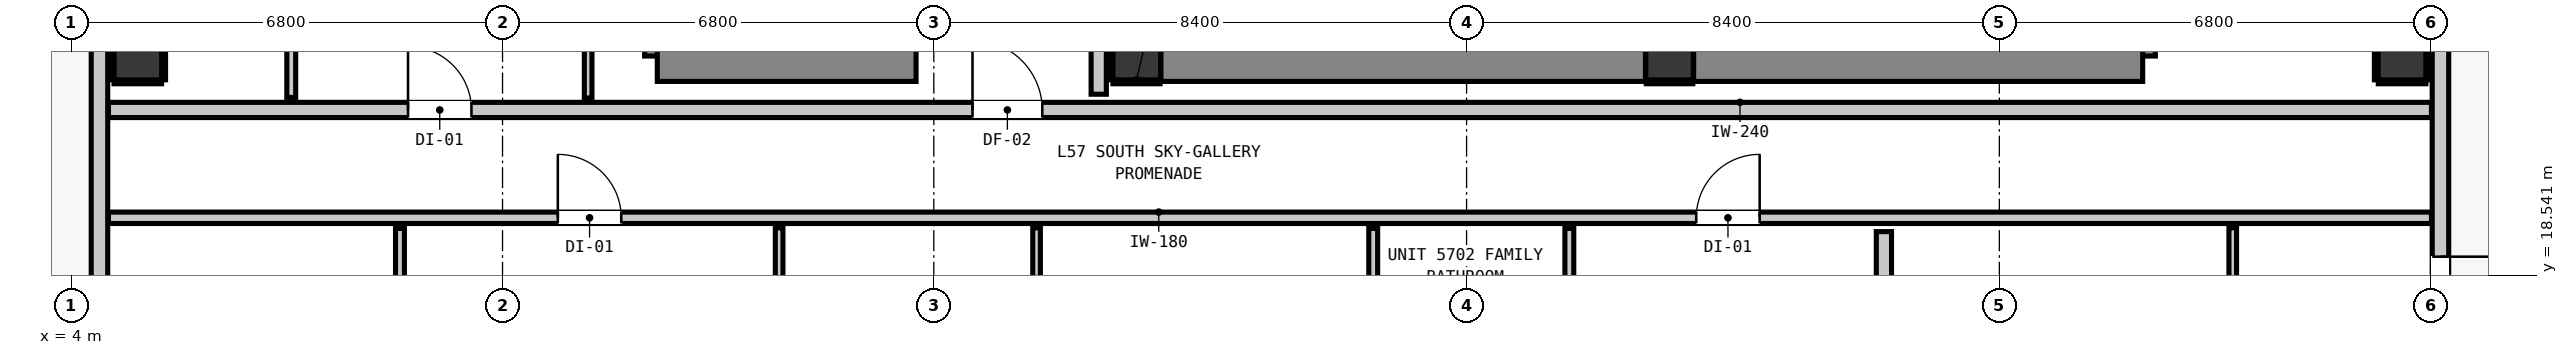
"""IFC4 building model, lengths in metres.
Left out: names, types, materials, properties, quantities, classifications, styles, units other than length and angle.
Written with IfcOpenShell. Run it as: python <this file> out.ifc"""

import sys

from ifc_helpers import new_model, si_unit, direction, frame, frame_2d, origin, origin_2d, place, context, subcontext, project, spatial, rectangle, extrude, element, fill, save


model = new_model("IFC4")
c1 = context("Model", 3, precision=1e-05, world=origin(), true_north=direction((0.0, 1.0)))
c2 = subcontext(c1, "Body", "Model", "MODEL_VIEW")
j1 = project(units=[si_unit("LENGTHUNIT", "METRE"), si_unit("PLANEANGLEUNIT", "RADIAN")], contexts=[c1])
p1 = place(None, origin())
s1 = spatial("IfcSite", under=j1, at=p1, CompositionType="ELEMENT")
p2 = place(p1, origin())
s2 = spatial("IfcBuilding", under=s1, at=p2, CompositionType="ELEMENT")
p3 = place(p2, frame((0.0, 0.0, 196.8)))
s3 = spatial("IfcBuildingStorey", under=s2, at=p3, CompositionType="ELEMENT", Elevation=196.8)
for number, where, z_axis, x_axis in (
    (1, (20.8, 22.0, 0.0), (0.0, 0.0, 1.0), (1.0, 0.0, 0.0)),
    (2, (29.2, 22.0, 0.0), (0.0, 0.0, 1.0), (1.0, 0.0, 0.0)),
):
    element("IfcColumn", number, at=place(p3, frame(where, z_axis=z_axis, x_axis=x_axis)), inside=s3, PredefinedType="COLUMN", context=c2, shape_type="SweptSolid", body=[
        extrude(rectangle(XDim=0.75, YDim=0.75, at=origin_2d()), origin(), (0.0, 0.0, 1.0), 3.32),
    ])
p4 = place(p3, frame((13.44, 22.0, 0.0), z_axis=(0.0, 0.0, 1.0), x_axis=(0.0, 1.0, 0.0)))
e3 = element("IfcWall", 3, at=p4, inside=s3, PredefinedType="SHEAR", context=c2, shape_type="SweptSolid", body=[
    extrude(rectangle(XDim=8.32, YDim=0.8, at=frame_2d((4.16, 0.0))), origin(), (0.0, 0.0, 1.0), 3.32),
])
p5 = place(p3, frame((13.24, 22.0, 0.0), z_axis=(0.0, 0.0, 1.0), x_axis=(1.0, 0.0, 0.0)))
e4 = element("IfcWall", 4, at=p5, inside=s3, PredefinedType="SHEAR", context=c2, shape_type="SweptSolid", body=[
    extrude(rectangle(XDim=4.08, YDim=0.8, at=frame_2d((2.04, 0.0))), origin(), (0.0, 0.0, 1.0), 3.32),
])
p6 = place(p3, frame((36.46, 22.0, 0.0), z_axis=(0.0, 0.0, 1.0), x_axis=(0.0, 1.0, 0.0)))
e5 = element("IfcWall", 5, at=p6, inside=s3, PredefinedType="SHEAR", context=c2, shape_type="SweptSolid", body=[
    extrude(rectangle(XDim=8.32, YDim=0.8, at=frame_2d((4.16, 0.0))), origin(), (0.0, 0.0, 1.0), 3.32),
])
p7 = place(p3, frame((29.58, 22.0, 0.0), z_axis=(0.0, 0.0, 1.0), x_axis=(1.0, 0.0, 0.0)))
e6 = element("IfcWall", 6, at=p7, inside=s3, PredefinedType="SHEAR", context=c2, shape_type="SweptSolid", body=[
    extrude(rectangle(XDim=7.08, YDim=0.8, at=frame_2d((3.54, 0.0))), origin(), (0.0, 0.0, 1.0), 3.32),
])
p8 = place(p3, frame((21.18, 22.0, 0.0), z_axis=(0.0, 0.0, 1.0), x_axis=(1.0, 0.0, 0.0)))
e7 = element("IfcWall", 7, at=p8, inside=s3, PredefinedType="SHEAR", context=c2, shape_type="SweptSolid", body=[
    extrude(rectangle(XDim=7.64, YDim=0.8, at=frame_2d((3.82, 0.0))), origin(), (0.0, 0.0, 1.0), 3.32),
])
for number, where, z_axis, x_axis in (
    (8, (5.05, 22.0, 0.0), (0.0, 0.0, 1.0), (1.0, 0.0, 0.0)),
    (9, (40.75, 22.0, 0.0), (0.0, 0.0, 1.0), (1.0, 0.0, 0.0)),
):
    element("IfcColumn", number, at=place(p3, frame(where, z_axis=z_axis, x_axis=x_axis)), inside=s3, PredefinedType="COLUMN", context=c2, shape_type="SweptSolid", body=[
        extrude(rectangle(XDim=0.75, YDim=0.75, at=origin_2d()), origin(), (0.0, 0.0, 1.0), 3.32),
    ])
p9 = place(p3, frame((4.445, 12.345, 0.0), z_axis=(0.0, 0.0, 1.0), x_axis=(0.0, 1.0, 0.0)))
e10 = element("IfcWall", 10, at=p9, inside=s3, PredefinedType="STANDARD", context=c2, shape_type="SweptSolid", body=[
    extrude(rectangle(XDim=30.31, YDim=0.26, at=frame_2d((15.155, 0.0))), origin(), (0.0, 0.0, 1.0), 3.1),
])
p10 = place(p9, frame((0.91, 0.0, 0.0)))
e11 = element("IfcOpeningElement", 11, at=p10, cuts=e10, PredefinedType="OPENING", context=c2, shape_type="SweptSolid", body=[
    extrude(rectangle(XDim=1.0, YDim=2.15, at=frame_2d((0.5, 1.075))), frame((0.0, 0.14, 0.0), z_axis=(0.0, -1.0, 0.0), x_axis=(1.0, 0.0, 0.0)), (0.0, 0.0, 1.0), 0.28),
])
p11 = place(p9, frame((2.322, 0.0, 0.85)))
e12 = element("IfcOpeningElement", 12, at=p11, cuts=e10, PredefinedType="OPENING", context=c2, shape_type="SweptSolid", body=[
    extrude(rectangle(XDim=0.58, YDim=1.5, at=frame_2d((0.29, 0.75))), frame((0.0, 0.14, 0.0), z_axis=(0.0, -1.0, 0.0), x_axis=(1.0, 0.0, 0.0)), (0.0, 0.0, 1.0), 0.28),
])
p12 = place(p9, frame((22.155, 0.0, 0.85)))
e13 = element("IfcOpeningElement", 13, at=p12, cuts=e10, PredefinedType="OPENING", context=c2, shape_type="SweptSolid", body=[
    extrude(rectangle(XDim=1.1, YDim=2.05, at=frame_2d((0.55, 1.025))), frame((0.0, 0.14, 0.0), z_axis=(0.0, -1.0, 0.0), x_axis=(1.0, 0.0, 0.0)), (0.0, 0.0, 1.0), 0.28),
])
p13 = place(p3, frame((41.355, 42.655, 0.0), z_axis=(0.0, 0.0, 1.0), x_axis=(0.0, -1.0, 0.0)))
e14 = element("IfcWall", 14, at=p13, inside=s3, PredefinedType="STANDARD", context=c2, shape_type="SweptSolid", body=[
    extrude(rectangle(XDim=30.31, YDim=0.26, at=frame_2d((15.155, 0.0))), origin(), (0.0, 0.0, 1.0), 3.1),
])
p14 = place(p13, frame((23.818, 0.0, 0.0)))
e15 = element("IfcOpeningElement", 15, at=p14, cuts=e14, PredefinedType="OPENING", context=c2, shape_type="SweptSolid", body=[
    extrude(rectangle(XDim=1.0, YDim=2.15, at=frame_2d((0.5, 1.075))), frame((0.0, 0.14, 0.0), z_axis=(0.0, -1.0, 0.0), x_axis=(1.0, 0.0, 0.0)), (0.0, 0.0, 1.0), 0.28),
])
p15 = place(p13, frame((25.457, 0.0, 0.85)))
e16 = element("IfcOpeningElement", 16, at=p15, cuts=e14, PredefinedType="OPENING", context=c2, shape_type="SweptSolid", body=[
    extrude(rectangle(XDim=1.1, YDim=2.05, at=frame_2d((0.55, 1.025))), frame((0.0, 0.14, 0.0), z_axis=(0.0, -1.0, 0.0), x_axis=(1.0, 0.0, 0.0)), (0.0, 0.0, 1.0), 0.28),
])
p16 = place(p13, frame((28.158, 0.0, 0.85)))
e17 = element("IfcOpeningElement", 17, at=p16, cuts=e14, PredefinedType="OPENING", context=c2, shape_type="SweptSolid", body=[
    extrude(rectangle(XDim=1.1, YDim=2.05, at=frame_2d((0.55, 1.025))), frame((0.0, 0.14, 0.0), z_axis=(0.0, -1.0, 0.0), x_axis=(1.0, 0.0, 0.0)), (0.0, 0.0, 1.0), 0.28),
])
p17 = place(p3, frame((4.587, 21.15, 0.0), z_axis=(0.0, 0.0, 1.0), x_axis=(1.0, 0.0, 0.0)))
e18 = element("IfcWall", 18, at=p17, inside=s3, PredefinedType="PARTITIONING", context=c2, shape_type="SweptSolid", body=[
    extrude(rectangle(XDim=36.626, YDim=0.24, at=frame_2d((18.313, 0.0))), origin(), (0.0, 0.0, 1.0), 3.1),
])
p18 = place(p17, frame((13.623, 0.0, 0.0)))
e19 = element("IfcOpeningElement", 19, at=p18, cuts=e18, PredefinedType="OPENING", context=c2, shape_type="SweptSolid", body=[
    extrude(rectangle(XDim=1.1, YDim=2.15, at=frame_2d((0.55, 1.075))), frame((0.0, 0.13, 0.0), z_axis=(0.0, -1.0, 0.0), x_axis=(1.0, 0.0, 0.0)), (0.0, 0.0, 1.0), 0.26),
])
p19 = place(p17, frame((4.723, 0.0, 0.0)))
e20 = element("IfcOpeningElement", 20, at=p19, cuts=e18, PredefinedType="OPENING", context=c2, shape_type="SweptSolid", body=[
    extrude(rectangle(XDim=1.0, YDim=2.15, at=frame_2d((0.5, 1.075))), frame((0.0, 0.13, 0.0), z_axis=(0.0, -1.0, 0.0), x_axis=(1.0, 0.0, 0.0)), (0.0, 0.0, 1.0), 0.26),
])
p20 = place(p3, frame((4.587, 19.45, 0.0), z_axis=(0.0, 0.0, 1.0), x_axis=(1.0, 0.0, 0.0)))
e21 = element("IfcWall", 21, at=p20, inside=s3, PredefinedType="PARTITIONING", context=c2, shape_type="SweptSolid", body=[
    extrude(rectangle(XDim=36.626, YDim=0.18, at=frame_2d((18.313, 0.0))), origin(), (0.0, 0.0, 1.0), 3.1),
])
p21 = place(p20, frame((7.085, 0.0, 0.0)))
e22 = element("IfcOpeningElement", 22, at=p21, cuts=e21, PredefinedType="OPENING", context=c2, shape_type="SweptSolid", body=[
    extrude(rectangle(XDim=1.0, YDim=2.15, at=frame_2d((0.5, 1.075))), frame((0.0, 0.1, 0.0), z_axis=(0.0, -1.0, 0.0), x_axis=(1.0, 0.0, 0.0)), (0.0, 0.0, 1.0), 0.2),
])
p22 = place(p20, frame((25.034, 0.0, 0.0)))
e23 = element("IfcOpeningElement", 23, at=p22, cuts=e21, PredefinedType="OPENING", context=c2, shape_type="SweptSolid", body=[
    extrude(rectangle(XDim=1.0, YDim=2.15, at=frame_2d((0.5, 1.075))), frame((0.0, 0.1, 0.0), z_axis=(0.0, -1.0, 0.0), x_axis=(1.0, 0.0, 0.0)), (0.0, 0.0, 1.0), 0.2),
])
p23 = place(p3, frame((20.2, 21.398, 0.0), z_axis=(0.0, 0.0, 1.0), x_axis=(0.0, 1.0, 0.0)))
e24 = element("IfcWall", 24, at=p23, inside=s3, PredefinedType="PARTITIONING", context=c2, shape_type="SweptSolid", body=[
    extrude(rectangle(XDim=6.754, YDim=0.24, at=frame_2d((3.377, 0.0))), origin(), (0.0, 0.0, 1.0), 3.1),
])
p24 = place(p3, frame((32.58, 15.75, 0.0), z_axis=(0.0, 0.0, 1.0), x_axis=(0.0, 1.0, 0.0)))
e25 = element("IfcWall", 25, at=p24, inside=s3, PredefinedType="PARTITIONING", context=c2, shape_type="SweptSolid", body=[
    extrude(rectangle(XDim=3.482, YDim=0.24, at=frame_2d((1.741, 0.0))), origin(), (0.0, 0.0, 1.0), 3.1),
])
p25 = place(p24, frame((1.292, 0.0, 0.0)))
e26 = element("IfcOpeningElement", 26, at=p25, cuts=e25, PredefinedType="OPENING", context=c2, shape_type="SweptSolid", body=[
    extrude(rectangle(XDim=0.9, YDim=2.1, at=frame_2d((0.45, 1.05))), frame((0.0, 0.13, 0.0), z_axis=(0.0, -1.0, 0.0), x_axis=(1.0, 0.0, 0.0)), (0.0, 0.0, 1.0), 0.26),
])
p26 = place(p3, frame((7.469, 21.348, 0.0), z_axis=(0.0, 0.0, 1.0), x_axis=(0.0, 1.0, 0.0)))
e27 = element("IfcWall", 27, at=p26, inside=s3, PredefinedType="PARTITIONING", context=c2, shape_type="SweptSolid", body=[
    extrude(rectangle(XDim=3.373, YDim=0.14, at=frame_2d((1.687, 0.0))), origin(), (0.0, 0.0, 1.0), 3.1),
])
p27 = place(p26, frame((1.224, 0.0, 0.0)))
e28 = element("IfcOpeningElement", 28, at=p27, cuts=e27, PredefinedType="OPENING", context=c2, shape_type="SweptSolid", body=[
    extrude(rectangle(XDim=0.9, YDim=2.1, at=frame_2d((0.45, 1.05))), frame((0.0, 0.08, 0.0), z_axis=(0.0, -1.0, 0.0), x_axis=(1.0, 0.0, 0.0)), (0.0, 0.0, 1.0), 0.16),
])
p28 = place(p3, frame((9.183, 15.707, 0.0), z_axis=(0.0, 0.0, 1.0), x_axis=(0.0, 1.0, 0.0)))
e29 = element("IfcWall", 29, at=p28, inside=s3, PredefinedType="PARTITIONING", context=c2, shape_type="SweptSolid", body=[
    extrude(rectangle(XDim=3.575, YDim=0.14, at=frame_2d((1.788, 0.0))), origin(), (0.0, 0.0, 1.0), 2.477),
])
p29 = place(p28, frame((1.355, 0.0, 0.0)))
e30 = element("IfcOpeningElement", 30, at=p29, cuts=e29, PredefinedType="OPENING", context=c2, shape_type="SweptSolid", body=[
    extrude(rectangle(XDim=0.86, YDim=2.02, at=frame_2d((0.43, 1.01))), frame((0.0, 0.08, 0.0), z_axis=(0.0, -1.0, 0.0), x_axis=(1.0, 0.0, 0.0)), (0.0, 0.0, 1.0), 0.16),
])
p30 = place(p3, frame((24.528, 15.707, 0.0), z_axis=(0.0, 0.0, 1.0), x_axis=(0.0, 1.0, 0.0)))
e31 = element("IfcWall", 31, at=p30, inside=s3, PredefinedType="PARTITIONING", context=c2, shape_type="SweptSolid", body=[
    extrude(rectangle(XDim=3.575, YDim=0.14, at=frame_2d((1.788, 0.0))), origin(), (0.0, 0.0, 1.0), 3.1),
])
p31 = place(p3, frame((27.62, 15.707, 0.0), z_axis=(0.0, 0.0, 1.0), x_axis=(0.0, 1.0, 0.0)))
e32 = element("IfcWall", 32, at=p31, inside=s3, PredefinedType="PARTITIONING", context=c2, shape_type="SweptSolid", body=[
    extrude(rectangle(XDim=3.575, YDim=0.14, at=frame_2d((1.788, 0.0))), origin(), (0.0, 0.0, 1.0), 3.1),
])
p32 = place(p31, frame((1.355, 0.0, 0.0)))
e33 = element("IfcOpeningElement", 33, at=p32, cuts=e32, PredefinedType="OPENING", context=c2, shape_type="SweptSolid", body=[
    extrude(rectangle(XDim=0.86, YDim=2.02, at=frame_2d((0.43, 1.01))), frame((0.0, 0.08, 0.0), z_axis=(0.0, -1.0, 0.0), x_axis=(1.0, 0.0, 0.0)), (0.0, 0.0, 1.0), 0.16),
])
p33 = place(p3, frame((12.15, 21.338, 0.0), z_axis=(0.0, 0.0, 1.0), x_axis=(0.0, 1.0, 0.0)))
e34 = element("IfcWall", 34, at=p33, inside=s3, PredefinedType="PARTITIONING", context=c2, shape_type="SweptSolid", body=[
    extrude(rectangle(XDim=8.324, YDim=0.12, at=frame_2d((4.162, 0.0))), origin(), (0.0, 0.0, 1.0), 3.1),
])
p34 = place(p3, frame((15.161, 15.697, 0.0), z_axis=(0.0, 0.0, 1.0), x_axis=(0.0, 1.0, 0.0)))
e35 = element("IfcWall", 35, at=p34, inside=s3, PredefinedType="PARTITIONING", context=c2, shape_type="SweptSolid", body=[
    extrude(rectangle(XDim=3.595, YDim=0.12, at=frame_2d((1.797, 0.0))), origin(), (0.0, 0.0, 1.0), 3.1),
])
p35 = place(p34, frame((1.345, 0.0, 0.0)))
e36 = element("IfcOpeningElement", 36, at=p35, cuts=e35, PredefinedType="OPENING", context=c2, shape_type="SweptSolid", body=[
    extrude(rectangle(XDim=0.9, YDim=2.1, at=frame_2d((0.45, 1.05))), frame((0.0, 0.07, 0.0), z_axis=(0.0, -1.0, 0.0), x_axis=(1.0, 0.0, 0.0)), (0.0, 0.0, 1.0), 0.14),
])
p36 = place(p3, frame((19.22, 15.697, 0.0), z_axis=(0.0, 0.0, 1.0), x_axis=(0.0, 1.0, 0.0)))
e37 = element("IfcWall", 37, at=p36, inside=s3, PredefinedType="PARTITIONING", context=c2, shape_type="SweptSolid", body=[
    extrude(rectangle(XDim=3.595, YDim=0.12, at=frame_2d((1.797, 0.0))), origin(), (0.0, 0.0, 1.0), 3.1),
])
p37 = place(p36, frame((1.358, 0.0, 0.0)))
e38 = element("IfcOpeningElement", 38, at=p37, cuts=e37, PredefinedType="OPENING", context=c2, shape_type="SweptSolid", body=[
    extrude(rectangle(XDim=0.9, YDim=2.1, at=frame_2d((0.45, 1.05))), frame((0.0, 0.07, 0.0), z_axis=(0.0, -1.0, 0.0), x_axis=(1.0, 0.0, 0.0)), (0.0, 0.0, 1.0), 0.14),
])
p38 = place(p3, frame((38.08, 15.697, 0.0), z_axis=(0.0, 0.0, 1.0), x_axis=(0.0, 1.0, 0.0)))
e39 = element("IfcWall", 39, at=p38, inside=s3, PredefinedType="PARTITIONING", context=c2, shape_type="SweptSolid", body=[
    extrude(rectangle(XDim=3.595, YDim=0.12, at=frame_2d((1.797, 0.0))), origin(), (0.0, 0.0, 1.0), 3.1),
])
p39 = place(p38, frame((1.358, 0.0, 0.0)))
e40 = element("IfcOpeningElement", 40, at=p39, cuts=e39, PredefinedType="OPENING", context=c2, shape_type="SweptSolid", body=[
    extrude(rectangle(XDim=0.9, YDim=2.1, at=frame_2d((0.45, 1.05))), frame((0.0, 0.07, 0.0), z_axis=(0.0, -1.0, 0.0), x_axis=(1.0, 0.0, 0.0)), (0.0, 0.0, 1.0), 0.14),
])
p40 = place(p3, frame((20.425, 21.593, 0.0), z_axis=(0.0, 0.0, 1.0), x_axis=(1.0, 0.0, 0.0)))
e41 = element("IfcWall", 41, at=p40, inside=s3, PredefinedType="PARTITIONING", context=c2, shape_type="SweptSolid", body=[
    extrude(rectangle(XDim=0.742, YDim=0.06, at=frame_2d((0.371, 0.0))), origin(), (0.0, 0.0, 1.0), 1.45),
])
p41 = place(p3, frame((20.393, 21.625, 0.0), z_axis=(0.0, 0.0, 1.0), x_axis=(0.0, 1.0, 0.0)))
e42 = element("IfcWall", 42, at=p41, inside=s3, PredefinedType="PARTITIONING", context=c2, shape_type="SweptSolid", body=[
    extrude(rectangle(XDim=0.75, YDim=0.06, at=frame_2d((0.375, 0.0))), origin(), (0.0, 0.0, 1.0), 1.45),
])
p42 = place(p3, frame((28.833, 21.593, 0.0), z_axis=(0.0, 0.0, 1.0), x_axis=(1.0, 0.0, 0.0)))
e43 = element("IfcWall", 43, at=p42, inside=s3, PredefinedType="PARTITIONING", context=c2, shape_type="SweptSolid", body=[
    extrude(rectangle(XDim=0.734, YDim=0.06, at=frame_2d((0.367, 0.0))), origin(), (0.0, 0.0, 1.0), 1.45),
])
for number, where, z_axis, x_axis in (
    (44, (4.675, 21.593, 0.0), (0.0, 0.0, 1.0), (1.0, 0.0, 0.0)),
    (45, (4.643, 21.625, 0.0), (0.0, 0.0, 1.0), (0.0, 1.0, 0.0)),
    (46, (5.457, 21.625, 0.0), (0.0, 0.0, 1.0), (0.0, 1.0, 0.0)),
    (47, (40.375, 21.593, 0.0), (0.0, 0.0, 1.0), (1.0, 0.0, 0.0)),
    (48, (40.343, 21.625, 0.0), (0.0, 0.0, 1.0), (0.0, 1.0, 0.0)),
    (49, (41.157, 21.625, 0.0), (0.0, 0.0, 1.0), (0.0, 1.0, 0.0)),
):
    element("IfcWall", number, at=place(p3, frame(where, z_axis=z_axis, x_axis=x_axis)), inside=s3, PredefinedType="PARTITIONING", context=c2, shape_type="SweptSolid", body=[
        extrude(rectangle(XDim=0.75, YDim=0.06, at=frame_2d((0.375, 0.0))), origin(), (0.0, 0.0, 1.0), 1.45),
    ])
p43 = place(p14, origin())
e50 = element("IfcDoor", 50, at=p43, inside=s3, OperationType="SINGLE_SWING_LEFT", PredefinedType="DOOR", context=c2, shape_type="SweptSolid", body=[
    extrude(rectangle(XDim=1.0, YDim=2.15, at=frame_2d((0.5, 1.075))), frame((0.0, 0.025, 0.0), z_axis=(0.0, -1.0, 0.0), x_axis=(1.0, 0.0, 0.0)), (0.0, 0.0, 1.0), 0.05),
])
fill(e15, e50)
p44 = place(p18, origin())
e51 = element("IfcDoor", 51, at=p44, inside=s3, OperationType="SINGLE_SWING_LEFT", PredefinedType="DOOR", context=c2, shape_type="SweptSolid", body=[
    extrude(rectangle(XDim=1.1, YDim=2.15, at=frame_2d((0.55, 1.075))), frame((0.0, 0.025, 0.0), z_axis=(0.0, -1.0, 0.0), x_axis=(1.0, 0.0, 0.0)), (0.0, 0.0, 1.0), 0.05),
])
fill(e19, e51)
p45 = place(p21, origin())
e52 = element("IfcDoor", 52, at=p45, inside=s3, OperationType="SINGLE_SWING_LEFT", PredefinedType="DOOR", context=c2, shape_type="SweptSolid", body=[
    extrude(rectangle(XDim=1.0, YDim=2.15, at=frame_2d((0.5, 1.075))), frame((0.0, 0.025, 0.0), z_axis=(0.0, -1.0, 0.0), x_axis=(1.0, 0.0, 0.0)), (0.0, 0.0, 1.0), 0.05),
])
fill(e22, e52)
p46 = place(p22, origin())
e53 = element("IfcDoor", 53, at=p46, inside=s3, OperationType="SINGLE_SWING_RIGHT", PredefinedType="DOOR", context=c2, shape_type="SweptSolid", body=[
    extrude(rectangle(XDim=1.0, YDim=2.15, at=frame_2d((0.5, 1.075))), frame((0.0, 0.025, 0.0), z_axis=(0.0, -1.0, 0.0), x_axis=(1.0, 0.0, 0.0)), (0.0, 0.0, 1.0), 0.05),
])
fill(e23, e53)
p47 = place(p19, origin())
e54 = element("IfcDoor", 54, at=p47, inside=s3, OperationType="SINGLE_SWING_LEFT", PredefinedType="DOOR", context=c2, shape_type="SweptSolid", body=[
    extrude(rectangle(XDim=1.0, YDim=2.15, at=frame_2d((0.5, 1.075))), frame((0.0, 0.025, 0.0), z_axis=(0.0, -1.0, 0.0), x_axis=(1.0, 0.0, 0.0)), (0.0, 0.0, 1.0), 0.05),
])
fill(e20, e54)
save(model, sys.argv[1])
